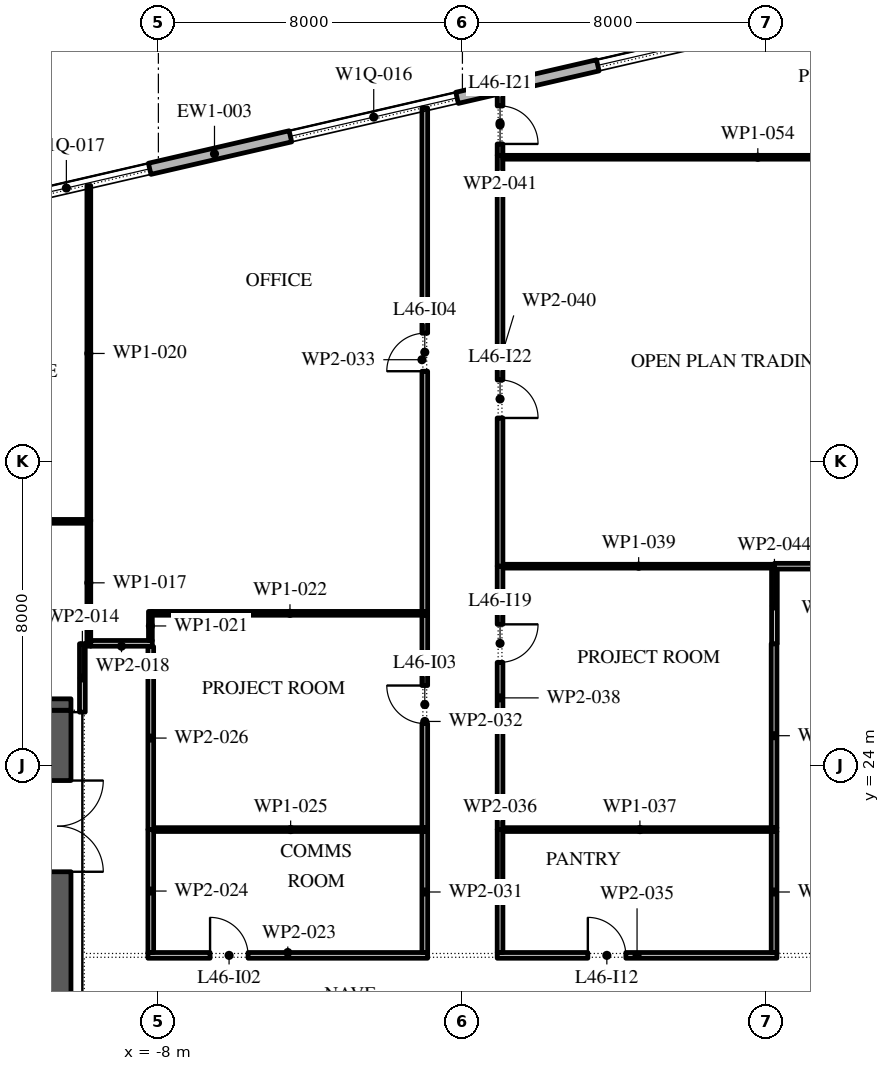
"""IFC4 building model, lengths in metres.
Left out: names, types, materials, properties, quantities, classifications, styles, units other than length and angle.
Written with IfcOpenShell. Run it as: python <this file> out.ifc"""

import sys

from ifc_helpers import new_model, si_unit, direction, frame, frame_2d, origin, place, context, subcontext, project, spatial, rectangle, extrude, element, fill, save


model = new_model("IFC4")
c1 = context("Model", 3, precision=1e-05, world=origin(), true_north=direction((0.0, 1.0)))
c2 = subcontext(c1, "Body", "Model", "MODEL_VIEW")
j1 = project(units=[si_unit("LENGTHUNIT", "METRE"), si_unit("PLANEANGLEUNIT", "RADIAN")], contexts=[c1])
p1 = place(None, origin())
s1 = spatial("IfcSite", under=j1, at=p1, CompositionType="ELEMENT")
p2 = place(p1, origin())
s2 = spatial("IfcBuilding", under=s1, at=p2, CompositionType="ELEMENT")
p3 = place(p2, frame((0.0, 0.0, 209.4)))
s3 = spatial("IfcBuildingStorey", under=s2, at=p3, CompositionType="ELEMENT", Elevation=209.4)
p4 = place(p3, frame((17.592, 45.657, 0.0), z_axis=(0.0, 0.0, 1.0), x_axis=(-0.974370243697, -0.224950279389, 0.0)))
e1 = element("IfcWall", 1, at=p4, inside=s3, PredefinedType="STANDARD", context=c2, shape_type="SweptSolid", body=[
    extrude(rectangle(XDim=49.5, YDim=0.3, at=frame_2d((24.75, 0.0))), origin(), (0.0, 0.0, 1.0), 4.0),
])
p5 = place(p4, frame((3.6, 0.0, 0.0)))
e2 = element("IfcOpeningElement", 2, at=p5, cuts=e1, PredefinedType="OPENING", context=c2, shape_type="SweptSolid", body=[
    extrude(rectangle(XDim=2.4, YDim=3.5, at=frame_2d((1.2, 1.75))), frame((0.0, 0.16, 0.0), z_axis=(0.0, -1.0, 0.0), x_axis=(1.0, 0.0, 0.0)), (0.0, 0.0, 1.0), 0.32),
])
p6 = place(p4, frame((9.9, 0.0, 0.45)))
e3 = element("IfcOpeningElement", 3, at=p6, cuts=e1, PredefinedType="OPENING", context=c2, shape_type="SweptSolid", body=[
    extrude(rectangle(XDim=4.5, YDim=2.45, at=frame_2d((2.25, 1.225))), frame((0.0, 0.16, 0.0), z_axis=(0.0, -1.0, 0.0), x_axis=(1.0, 0.0, 0.0)), (0.0, 0.0, 1.0), 0.32),
])
p7 = place(p4, frame((18.2, 0.0, 0.45)))
e4 = element("IfcOpeningElement", 4, at=p7, cuts=e1, PredefinedType="OPENING", context=c2, shape_type="SweptSolid", body=[
    extrude(rectangle(XDim=4.5, YDim=2.45, at=frame_2d((2.25, 1.225))), frame((0.0, 0.16, 0.0), z_axis=(0.0, -1.0, 0.0), x_axis=(1.0, 0.0, 0.0)), (0.0, 0.0, 1.0), 0.32),
])
p8 = place(p4, frame((26.5, 0.0, 0.45)))
e5 = element("IfcOpeningElement", 5, at=p8, cuts=e1, PredefinedType="OPENING", context=c2, shape_type="SweptSolid", body=[
    extrude(rectangle(XDim=4.5, YDim=2.45, at=frame_2d((2.25, 1.225))), frame((0.0, 0.16, 0.0), z_axis=(0.0, -1.0, 0.0), x_axis=(1.0, 0.0, 0.0)), (0.0, 0.0, 1.0), 0.32),
])
p9 = place(p4, frame((35.85, 0.0, 0.0)))
e6 = element("IfcOpeningElement", 6, at=p9, cuts=e1, PredefinedType="OPENING", context=c2, shape_type="SweptSolid", body=[
    extrude(rectangle(XDim=2.4, YDim=3.5, at=frame_2d((1.2, 1.75))), frame((0.0, 0.16, 0.0), z_axis=(0.0, -1.0, 0.0), x_axis=(1.0, 0.0, 0.0)), (0.0, 0.0, 1.0), 0.32),
])
p10 = place(p4, frame((43.1, 0.0, 0.45)))
e7 = element("IfcOpeningElement", 7, at=p10, cuts=e1, PredefinedType="OPENING", context=c2, shape_type="SweptSolid", body=[
    extrude(rectangle(XDim=4.5, YDim=2.575, at=frame_2d((2.25, 1.288))), frame((0.0, 0.16, 0.0), z_axis=(0.0, -1.0, 0.0), x_axis=(1.0, 0.0, 0.0)), (0.0, 0.0, 1.0), 0.32),
])
p11 = place(p3, frame((-10.65, -2.45, 0.0), z_axis=(0.0, 0.0, 1.0), x_axis=(0.0, 1.0, 0.0)))
e8 = element("IfcWall", 8, at=p11, inside=s3, PredefinedType="SHEAR", context=c2, shape_type="SweptSolid", body=[
    extrude(rectangle(XDim=27.9, YDim=0.7, at=frame_2d((13.95, 0.0))), origin(), (0.0, 0.0, 1.0), 4.0),
])
p12 = place(p11, frame((23.65, 0.0, 0.0)))
e9 = element("IfcOpeningElement", 9, at=p12, cuts=e8, PredefinedType="OPENING", context=c2, shape_type="SweptSolid", body=[
    extrude(rectangle(XDim=2.4, YDim=2.1, at=frame_2d((1.2, 1.05))), frame((0.0, 0.36, 0.0), z_axis=(0.0, -1.0, 0.0), x_axis=(1.0, 0.0, 0.0)), (0.0, 0.0, 1.0), 0.72),
])
p13 = place(p11, frame((0.788, 0.0, 0.0)))
e10 = element("IfcOpeningElement", 10, at=p13, cuts=e8, PredefinedType="OPENING", context=c2, shape_type="SweptSolid", body=[
    extrude(rectangle(XDim=0.9, YDim=2.1, at=frame_2d((0.45, 1.05))), frame((0.0, 0.36, 0.0), z_axis=(0.0, -1.0, 0.0), x_axis=(1.0, 0.0, 0.0)), (0.0, 0.0, 1.0), 0.72),
])
p14 = place(p11, frame((3.962, 0.0, 0.0)))
e11 = element("IfcOpeningElement", 11, at=p14, cuts=e8, PredefinedType="OPENING", context=c2, shape_type="SweptSolid", body=[
    extrude(rectangle(XDim=1.0, YDim=2.1, at=frame_2d((0.5, 1.05))), frame((0.0, 0.36, 0.0), z_axis=(0.0, -1.0, 0.0), x_axis=(1.0, 0.0, 0.0)), (0.0, 0.0, 1.0), 0.72),
])
p15 = place(p3, frame((-21.7, 25.6, 0.0), z_axis=(0.0, 0.0, 1.0), x_axis=(1.0, 0.0, 0.0)))
e12 = element("IfcWall", 12, at=p15, inside=s3, PredefinedType="SHEAR", context=c2, shape_type="SweptSolid", body=[
    extrude(rectangle(XDim=11.4, YDim=0.3, at=frame_2d((5.7, 0.0))), origin(), (0.0, 0.0, 1.0), 4.0),
])
p16 = place(p3, frame((-10.0, 25.4, 0.0), z_axis=(0.0, 0.0, 1.0), x_axis=(0.0, 1.0, 0.0)))
e13 = element("IfcWall", 13, at=p16, inside=s3, PredefinedType="PARTITIONING", context=c2, shape_type="SweptSolid", body=[
    extrude(rectangle(XDim=1.8, YDim=0.15, at=frame_2d((0.9, 0.0))), origin(), (0.0, 0.0, 1.0), 4.0),
])
p17 = place(p3, frame((-9.83, 27.135, 0.0), z_axis=(0.0, 0.0, 1.0), x_axis=(0.0, 1.0, 0.0)))
e14 = element("IfcWall", 14, at=p17, inside=s3, PredefinedType="PARTITIONING", context=c2, shape_type="SweptSolid", body=[
    extrude(rectangle(XDim=3.335, YDim=0.1, at=frame_2d((1.667, 0.0))), origin(), (0.0, 0.0, 1.0), 4.0),
])
p18 = place(p3, frame((-9.78, 27.21, 0.0), z_axis=(0.0, 0.0, 1.0), x_axis=(1.0, 0.0, 0.0)))
e15 = element("IfcWall", 15, at=p18, inside=s3, PredefinedType="PARTITIONING", context=c2, shape_type="SweptSolid", body=[
    extrude(rectangle(XDim=1.62, YDim=0.15, at=frame_2d((0.81, 0.0))), origin(), (0.0, 0.0, 1.0), 4.0),
])
p19 = place(p3, frame((-9.88, 30.42, 0.0), z_axis=(0.0, 0.0, 1.0), x_axis=(-1.0, 0.0, 0.0)))
e16 = element("IfcWall", 16, at=p19, inside=s3, PredefinedType="PARTITIONING", context=c2, shape_type="SweptSolid", body=[
    extrude(rectangle(XDim=12.59, YDim=0.1, at=frame_2d((6.295, 0.0))), origin(), (0.0, 0.0, 1.0), 4.0),
])
p20 = place(p3, frame((-9.83, 30.42, 0.0), z_axis=(0.0, 0.0, 1.0), x_axis=(0.0, 1.0, 0.0)))
e17 = element("IfcWall", 17, at=p20, inside=s3, PredefinedType="PARTITIONING", context=c2, shape_type="SweptSolid", body=[
    extrude(rectangle(XDim=8.835, YDim=0.1, at=frame_2d((4.417, 0.0))), origin(), (0.0, 0.0, 1.0), 4.0),
])
p21 = place(p3, frame((-8.21, 27.285, 0.0), z_axis=(0.0, 0.0, 1.0), x_axis=(0.0, 1.0, 0.0)))
e18 = element("IfcWall", 18, at=p21, inside=s3, PredefinedType="PARTITIONING", context=c2, shape_type="SweptSolid", body=[
    extrude(rectangle(XDim=0.765, YDim=0.1, at=frame_2d((0.383, 0.0))), origin(), (0.0, 0.0, 1.0), 4.0),
])
p22 = place(p3, frame((-8.16, 28.0, 0.0), z_axis=(0.0, 0.0, 1.0), x_axis=(1.0, 0.0, 0.0)))
e19 = element("IfcWall", 19, at=p22, inside=s3, PredefinedType="PARTITIONING", context=c2, shape_type="SweptSolid", body=[
    extrude(rectangle(XDim=7.245, YDim=0.1, at=frame_2d((3.623, 0.0))), origin(), (0.0, 0.0, 1.0), 4.0),
])
p23 = place(p3, frame((-8.275, 19.0, 0.0), z_axis=(0.0, 0.0, 1.0), x_axis=(1.0, 0.0, 0.0)))
e20 = element("IfcWall", 20, at=p23, inside=s3, PredefinedType="PARTITIONING", context=c2, shape_type="SweptSolid", body=[
    extrude(rectangle(XDim=7.36, YDim=0.15, at=frame_2d((3.68, 0.0))), origin(), (0.0, 0.0, 1.0), 4.0),
])
p24 = place(p23, frame((1.635, 0.0, 0.0)))
e21 = element("IfcOpeningElement", 21, at=p24, cuts=e20, PredefinedType="OPENING", context=c2, shape_type="SweptSolid", body=[
    extrude(rectangle(XDim=1.0, YDim=2.1, at=frame_2d((0.5, 1.05))), frame((0.0, 0.085, 0.0), z_axis=(0.0, -1.0, 0.0), x_axis=(1.0, 0.0, 0.0)), (0.0, 0.0, 1.0), 0.17),
])
p25 = place(p3, frame((-8.2, 22.31, 0.0), z_axis=(0.0, 0.0, 1.0), x_axis=(0.0, -1.0, 0.0)))
e22 = element("IfcWall", 22, at=p25, inside=s3, PredefinedType="PARTITIONING", context=c2, shape_type="SweptSolid", body=[
    extrude(rectangle(XDim=3.235, YDim=0.15, at=frame_2d((1.618, 0.0))), origin(), (0.0, 0.0, 1.0), 4.0),
])
p26 = place(p3, frame((-8.125, 22.31, 0.0), z_axis=(0.0, 0.0, 1.0), x_axis=(1.0, 0.0, 0.0)))
e23 = element("IfcWall", 23, at=p26, inside=s3, PredefinedType="PARTITIONING", context=c2, shape_type="SweptSolid", body=[
    extrude(rectangle(XDim=7.21, YDim=0.1, at=frame_2d((3.605, 0.0))), origin(), (0.0, 0.0, 1.0), 4.0),
])
p27 = place(p3, frame((-8.2, 27.125, 0.0), z_axis=(0.0, 0.0, 1.0), x_axis=(0.0, -1.0, 0.0)))
e24 = element("IfcWall", 24, at=p27, inside=s3, PredefinedType="PARTITIONING", context=c2, shape_type="SweptSolid", body=[
    extrude(rectangle(XDim=4.815, YDim=0.15, at=frame_2d((2.407, 0.0))), origin(), (0.0, 0.0, 1.0), 4.0),
])
p28 = place(p3, frame((-0.99, 19.075, 0.0), z_axis=(0.0, 0.0, 1.0), x_axis=(0.0, 1.0, 0.0)))
e25 = element("IfcWall", 25, at=p28, inside=s3, PredefinedType="PARTITIONING", context=c2, shape_type="SweptSolid", body=[
    extrude(rectangle(XDim=3.185, YDim=0.15, at=frame_2d((1.593, 0.0))), origin(), (0.0, 0.0, 1.0), 4.0),
])
p29 = place(p3, frame((-0.99, 22.36, 0.0), z_axis=(0.0, 0.0, 1.0), x_axis=(0.0, 1.0, 0.0)))
e26 = element("IfcWall", 26, at=p29, inside=s3, PredefinedType="PARTITIONING", context=c2, shape_type="SweptSolid", body=[
    extrude(rectangle(XDim=5.59, YDim=0.15, at=frame_2d((2.795, 0.0))), origin(), (0.0, 0.0, 1.0), 4.0),
])
p30 = place(p29, frame((2.74, 0.0, 0.0)))
e27 = element("IfcOpeningElement", 27, at=p30, cuts=e26, PredefinedType="OPENING", context=c2, shape_type="SweptSolid", body=[
    extrude(rectangle(XDim=1.0, YDim=2.1, at=frame_2d((0.5, 1.05))), frame((0.0, 0.085, 0.0), z_axis=(0.0, -1.0, 0.0), x_axis=(1.0, 0.0, 0.0)), (0.0, 0.0, 1.0), 0.17),
])
p31 = place(p3, frame((-0.99, 28.05, 0.0), z_axis=(0.0, 0.0, 1.0), x_axis=(0.0, 1.0, 0.0)))
e28 = element("IfcWall", 28, at=p31, inside=s3, PredefinedType="PARTITIONING", context=c2, shape_type="SweptSolid", body=[
    extrude(rectangle(XDim=13.246, YDim=0.15, at=frame_2d((6.623, 0.0))), origin(), (0.0, 0.0, 1.0), 4.0),
])
p32 = place(p31, frame((6.32, 0.0, 0.0)))
e29 = element("IfcOpeningElement", 29, at=p32, cuts=e28, PredefinedType="OPENING", context=c2, shape_type="SweptSolid", body=[
    extrude(rectangle(XDim=1.0, YDim=2.1, at=frame_2d((0.5, 1.05))), frame((0.0, 0.085, 0.0), z_axis=(0.0, -1.0, 0.0), x_axis=(1.0, 0.0, 0.0)), (0.0, 0.0, 1.0), 0.17),
])
p33 = place(p3, frame((0.915, 19.0, 0.0), z_axis=(0.0, 0.0, 1.0), x_axis=(1.0, 0.0, 0.0)))
e30 = element("IfcWall", 30, at=p33, inside=s3, PredefinedType="PARTITIONING", context=c2, shape_type="SweptSolid", body=[
    extrude(rectangle(XDim=7.36, YDim=0.15, at=frame_2d((3.68, 0.0))), origin(), (0.0, 0.0, 1.0), 4.0),
])
p34 = place(p33, frame((2.385, 0.0, 0.0)))
e31 = element("IfcOpeningElement", 31, at=p34, cuts=e30, PredefinedType="OPENING", context=c2, shape_type="SweptSolid", body=[
    extrude(rectangle(XDim=1.0, YDim=2.1, at=frame_2d((0.5, 1.05))), frame((0.0, 0.085, 0.0), z_axis=(0.0, -1.0, 0.0), x_axis=(1.0, 0.0, 0.0)), (0.0, 0.0, 1.0), 0.17),
])
p35 = place(p3, frame((0.99, 22.31, 0.0), z_axis=(0.0, 0.0, 1.0), x_axis=(0.0, -1.0, 0.0)))
e32 = element("IfcWall", 32, at=p35, inside=s3, PredefinedType="PARTITIONING", context=c2, shape_type="SweptSolid", body=[
    extrude(rectangle(XDim=3.235, YDim=0.15, at=frame_2d((1.618, 0.0))), origin(), (0.0, 0.0, 1.0), 4.0),
])
p36 = place(p3, frame((1.065, 22.31, 0.0), z_axis=(0.0, 0.0, 1.0), x_axis=(1.0, 0.0, 0.0)))
e33 = element("IfcWall", 33, at=p36, inside=s3, PredefinedType="PARTITIONING", context=c2, shape_type="SweptSolid", body=[
    extrude(rectangle(XDim=7.21, YDim=0.1, at=frame_2d((3.605, 0.0))), origin(), (0.0, 0.0, 1.0), 4.0),
])
p37 = place(p3, frame((0.99, 29.24, 0.0), z_axis=(0.0, 0.0, 1.0), x_axis=(0.0, -1.0, 0.0)))
e34 = element("IfcWall", 34, at=p37, inside=s3, PredefinedType="PARTITIONING", context=c2, shape_type="SweptSolid", body=[
    extrude(rectangle(XDim=6.93, YDim=0.15, at=frame_2d((3.465, 0.0))), origin(), (0.0, 0.0, 1.0), 4.0),
])
p38 = place(p37, frame((1.53, 0.0, 0.0)))
e35 = element("IfcOpeningElement", 35, at=p38, cuts=e34, PredefinedType="OPENING", context=c2, shape_type="SweptSolid", body=[
    extrude(rectangle(XDim=1.0, YDim=2.1, at=frame_2d((0.5, 1.05))), frame((0.0, 0.085, 0.0), z_axis=(0.0, -1.0, 0.0), x_axis=(1.0, 0.0, 0.0)), (0.0, 0.0, 1.0), 0.17),
])
p39 = place(p3, frame((1.065, 29.24, 0.0), z_axis=(0.0, 0.0, 1.0), x_axis=(1.0, 0.0, 0.0)))
e36 = element("IfcWall", 36, at=p39, inside=s3, PredefinedType="PARTITIONING", context=c2, shape_type="SweptSolid", body=[
    extrude(rectangle(XDim=7.145, YDim=0.1, at=frame_2d((3.573, 0.0))), origin(), (0.0, 0.0, 1.0), 4.0),
])
p40 = place(p3, frame((0.99, 40.05, 0.0), z_axis=(0.0, 0.0, 1.0), x_axis=(0.0, -1.0, 0.0)))
e37 = element("IfcWall", 37, at=p40, inside=s3, PredefinedType="PARTITIONING", context=c2, shape_type="SweptSolid", body=[
    extrude(rectangle(XDim=10.81, YDim=0.15, at=frame_2d((5.405, 0.0))), origin(), (0.0, 0.0, 1.0), 4.0),
])
p41 = place(p40, frame((5.91, 0.0, 0.0)))
e38 = element("IfcOpeningElement", 38, at=p41, cuts=e37, PredefinedType="OPENING", context=c2, shape_type="SweptSolid", body=[
    extrude(rectangle(XDim=1.0, YDim=2.1, at=frame_2d((0.5, 1.05))), frame((0.0, 0.085, 0.0), z_axis=(0.0, -1.0, 0.0), x_axis=(1.0, 0.0, 0.0)), (0.0, 0.0, 1.0), 0.17),
])
p42 = place(p3, frame((0.99, 41.753, 0.0), z_axis=(0.0, 0.0, 1.0), x_axis=(0.0, -1.0, 0.0)))
e39 = element("IfcWall", 39, at=p42, inside=s3, PredefinedType="PARTITIONING", context=c2, shape_type="SweptSolid", body=[
    extrude(rectangle(XDim=1.703, YDim=0.15, at=frame_2d((0.852, 0.0))), origin(), (0.0, 0.0, 1.0), 4.0),
])
p43 = place(p42, frame((0.403, 0.0, 0.0)))
e40 = element("IfcOpeningElement", 40, at=p43, cuts=e39, PredefinedType="OPENING", context=c2, shape_type="SweptSolid", body=[
    extrude(rectangle(XDim=1.0, YDim=2.1, at=frame_2d((0.5, 1.05))), frame((0.0, 0.085, 0.0), z_axis=(0.0, -1.0, 0.0), x_axis=(1.0, 0.0, 0.0)), (0.0, 0.0, 1.0), 0.17),
])
p44 = place(p3, frame((8.2, 19.075, 0.0), z_axis=(0.0, 0.0, 1.0), x_axis=(0.0, 1.0, 0.0)))
e41 = element("IfcWall", 41, at=p44, inside=s3, PredefinedType="PARTITIONING", context=c2, shape_type="SweptSolid", body=[
    extrude(rectangle(XDim=3.185, YDim=0.15, at=frame_2d((1.593, 0.0))), origin(), (0.0, 0.0, 1.0), 4.0),
])
p45 = place(p3, frame((8.2, 22.36, 0.0), z_axis=(0.0, 0.0, 1.0), x_axis=(0.0, 1.0, 0.0)))
e42 = element("IfcWall", 42, at=p45, inside=s3, PredefinedType="PARTITIONING", context=c2, shape_type="SweptSolid", body=[
    extrude(rectangle(XDim=4.84, YDim=0.15, at=frame_2d((2.42, 0.0))), origin(), (0.0, 0.0, 1.0), 4.0),
])
p46 = place(p3, frame((8.21, 27.2, 0.0), z_axis=(0.0, 0.0, 1.0), x_axis=(0.0, 1.0, 0.0)))
e43 = element("IfcWall", 43, at=p46, inside=s3, PredefinedType="PARTITIONING", context=c2, shape_type="SweptSolid", body=[
    extrude(rectangle(XDim=1.99, YDim=0.15, at=frame_2d((0.995, 0.0))), origin(), (0.0, 0.0, 1.0), 4.0),
])
p47 = place(p3, frame((8.21, 29.24, 0.0), z_axis=(0.0, 0.0, 1.0), x_axis=(1.0, 0.0, 0.0)))
e44 = element("IfcWall", 44, at=p47, inside=s3, PredefinedType="PARTITIONING", context=c2, shape_type="SweptSolid", body=[
    extrude(rectangle(XDim=3.365, YDim=0.15, at=frame_2d((1.683, 0.0))), origin(), (0.0, 0.0, 1.0), 4.0),
])
p48 = place(p3, frame((14.48, 40.0, 0.0), z_axis=(0.0, 0.0, 1.0), x_axis=(-1.0, 0.0, 0.0)))
e45 = element("IfcWall", 45, at=p48, inside=s3, PredefinedType="PARTITIONING", context=c2, shape_type="SweptSolid", body=[
    extrude(rectangle(XDim=13.415, YDim=0.1, at=frame_2d((6.708, 0.0))), origin(), (0.0, 0.0, 1.0), 4.0),
])
p49 = place(p6, origin())
e46 = element("IfcWindow", 46, at=p49, inside=s3, PartitioningType="DOUBLE_PANEL_VERTICAL", PredefinedType="WINDOW", context=c2, shape_type="SweptSolid", body=[
    extrude(rectangle(XDim=4.5, YDim=2.45, at=frame_2d((2.25, 1.225))), frame((0.0, 0.03, 0.0), z_axis=(0.0, -1.0, 0.0), x_axis=(1.0, 0.0, 0.0)), (0.0, 0.0, 1.0), 0.06),
])
fill(e3, e46)
p50 = place(p7, origin())
e47 = element("IfcWindow", 47, at=p50, inside=s3, PartitioningType="DOUBLE_PANEL_VERTICAL", PredefinedType="WINDOW", context=c2, shape_type="SweptSolid", body=[
    extrude(rectangle(XDim=4.5, YDim=2.45, at=frame_2d((2.25, 1.225))), frame((0.0, 0.03, 0.0), z_axis=(0.0, -1.0, 0.0), x_axis=(1.0, 0.0, 0.0)), (0.0, 0.0, 1.0), 0.06),
])
fill(e4, e47)
p51 = place(p8, origin())
e48 = element("IfcWindow", 48, at=p51, inside=s3, PartitioningType="DOUBLE_PANEL_VERTICAL", PredefinedType="WINDOW", context=c2, shape_type="SweptSolid", body=[
    extrude(rectangle(XDim=4.5, YDim=2.45, at=frame_2d((2.25, 1.225))), frame((0.0, 0.03, 0.0), z_axis=(0.0, -1.0, 0.0), x_axis=(1.0, 0.0, 0.0)), (0.0, 0.0, 1.0), 0.06),
])
fill(e5, e48)
p52 = place(p12, frame((2.4, 0.0, 0.0), z_axis=(0.0, 0.0, 1.0), x_axis=(-1.0, 0.0, 0.0)))
e49 = element("IfcDoor", 49, at=p52, inside=s3, OperationType="DOUBLE_DOOR_SINGLE_SWING", PredefinedType="DOOR", context=c2, shape_type="SweptSolid", body=[
    extrude(rectangle(XDim=2.4, YDim=2.1, at=frame_2d((1.2, 1.05))), frame((0.0, 0.025, 0.0), z_axis=(0.0, -1.0, 0.0), x_axis=(1.0, 0.0, 0.0)), (0.0, 0.0, 1.0), 0.05),
])
fill(e9, e49)
p53 = place(p24, origin())
e50 = element("IfcDoor", 50, at=p53, inside=s3, OperationType="SINGLE_SWING_RIGHT", PredefinedType="DOOR", context=c2, shape_type="SweptSolid", body=[
    extrude(rectangle(XDim=1.0, YDim=2.1, at=frame_2d((0.5, 1.05))), frame((0.0, 0.025, 0.0), z_axis=(0.0, -1.0, 0.0), x_axis=(1.0, 0.0, 0.0)), (0.0, 0.0, 1.0), 0.05),
])
fill(e21, e50)
p54 = place(p30, origin())
e51 = element("IfcDoor", 51, at=p54, inside=s3, OperationType="SINGLE_SWING_LEFT", PredefinedType="DOOR", context=c2, shape_type="SweptSolid", body=[
    extrude(rectangle(XDim=1.0, YDim=2.1, at=frame_2d((0.5, 1.05))), frame((0.0, 0.025, 0.0), z_axis=(0.0, -1.0, 0.0), x_axis=(1.0, 0.0, 0.0)), (0.0, 0.0, 1.0), 0.05),
])
fill(e27, e51)
p55 = place(p32, origin())
e52 = element("IfcDoor", 52, at=p55, inside=s3, OperationType="SINGLE_SWING_RIGHT", PredefinedType="DOOR", context=c2, shape_type="SweptSolid", body=[
    extrude(rectangle(XDim=1.0, YDim=2.1, at=frame_2d((0.5, 1.05))), frame((0.0, 0.025, 0.0), z_axis=(0.0, -1.0, 0.0), x_axis=(1.0, 0.0, 0.0)), (0.0, 0.0, 1.0), 0.05),
])
fill(e29, e52)
p56 = place(p34, origin())
e53 = element("IfcDoor", 53, at=p56, inside=s3, OperationType="SINGLE_SWING_RIGHT", PredefinedType="DOOR", context=c2, shape_type="SweptSolid", body=[
    extrude(rectangle(XDim=1.0, YDim=2.1, at=frame_2d((0.5, 1.05))), frame((0.0, 0.025, 0.0), z_axis=(0.0, -1.0, 0.0), x_axis=(1.0, 0.0, 0.0)), (0.0, 0.0, 1.0), 0.05),
])
fill(e31, e53)
p57 = place(p38, origin())
e54 = element("IfcDoor", 54, at=p57, inside=s3, OperationType="SINGLE_SWING_RIGHT", PredefinedType="DOOR", context=c2, shape_type="SweptSolid", body=[
    extrude(rectangle(XDim=1.0, YDim=2.1, at=frame_2d((0.5, 1.05))), frame((0.0, 0.025, 0.0), z_axis=(0.0, -1.0, 0.0), x_axis=(1.0, 0.0, 0.0)), (0.0, 0.0, 1.0), 0.05),
])
fill(e35, e54)
p58 = place(p43, origin())
e55 = element("IfcDoor", 55, at=p58, inside=s3, OperationType="SINGLE_SWING_LEFT", PredefinedType="DOOR", context=c2, shape_type="SweptSolid", body=[
    extrude(rectangle(XDim=1.0, YDim=2.1, at=frame_2d((0.5, 1.05))), frame((0.0, 0.025, 0.0), z_axis=(0.0, -1.0, 0.0), x_axis=(1.0, 0.0, 0.0)), (0.0, 0.0, 1.0), 0.05),
])
fill(e40, e55)
p59 = place(p41, origin())
e56 = element("IfcDoor", 56, at=p59, inside=s3, OperationType="SINGLE_SWING_LEFT", PredefinedType="DOOR", context=c2, shape_type="SweptSolid", body=[
    extrude(rectangle(XDim=1.0, YDim=2.1, at=frame_2d((0.5, 1.05))), frame((0.0, 0.025, 0.0), z_axis=(0.0, -1.0, 0.0), x_axis=(1.0, 0.0, 0.0)), (0.0, 0.0, 1.0), 0.05),
])
fill(e38, e56)
save(model, sys.argv[1])
